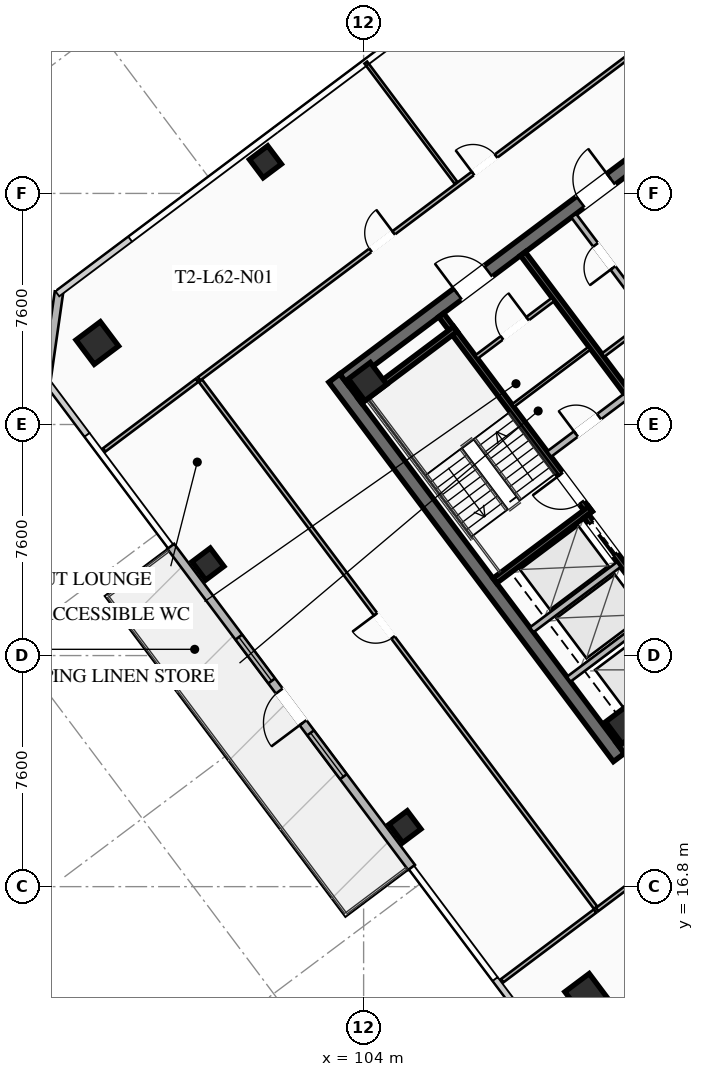
"""IFC4 building model, lengths in metres.
Left out: names, types, materials, properties, quantities, classifications, styles, units other than length and angle.
Written with IfcOpenShell. Run it as: python <this file> out.ifc"""

import sys

from ifc_helpers import new_model, si_unit, direction, frame, frame_2d, origin, origin_2d, place, context, subcontext, project, spatial, rectangle, hollow_rectangle, extrude, element, fill, save


model = new_model("IFC4")
c1 = context("Model", 3, precision=1e-05, world=origin(), true_north=direction((0.0, 1.0)))
c2 = subcontext(c1, "Body", "Model", "MODEL_VIEW")
j1 = project(units=[si_unit("LENGTHUNIT", "METRE"), si_unit("PLANEANGLEUNIT", "RADIAN")], contexts=[c1])
p1 = place(None, origin())
s1 = spatial("IfcSite", under=j1, at=p1, CompositionType="ELEMENT")
p2 = place(p1, origin())
s2 = spatial("IfcBuilding", under=s1, at=p2, CompositionType="ELEMENT")
p3 = place(p2, frame((0.0, 0.0, 229.05)))
s3 = spatial("IfcBuildingStorey", under=s2, at=p3, CompositionType="ELEMENT", Elevation=229.05)
p4 = place(p3, frame((112.396, 21.047, 0.0), z_axis=(0.0, 0.0, 1.0), x_axis=(-0.600005007985, 0.799996243986, 0.0)))
e1 = element("IfcWall", 1, at=p4, inside=s3, PredefinedType="SHEAR", context=c2, shape_type="SweptSolid", body=[
    extrude(rectangle(XDim=15.6, YDim=0.45, at=frame_2d((7.8, 0.0))), origin(), (0.0, 0.0, 1.0), 3.55),
])
p5 = place(p3, frame((124.649, 30.518, 0.0), z_axis=(0.0, 0.0, 1.0), x_axis=(-0.8, -0.6, 0.0)))
e2 = element("IfcWall", 2, at=p5, inside=s3, PredefinedType="SHEAR", context=c2, shape_type="SweptSolid", body=[
    extrude(rectangle(XDim=15.26, YDim=0.45, at=frame_2d((7.63, 0.0))), origin(), (0.0, 0.0, 1.0), 3.55),
])
p6 = place(p5, frame((9.33, 0.0, 0.0)))
e3 = element("IfcOpeningElement", 3, at=p6, cuts=e2, PredefinedType="OPENING", context=c2, shape_type="SweptSolid", body=[
    extrude(rectangle(XDim=1.25, YDim=2.25, at=frame_2d((0.625, 1.125))), frame((0.0, 0.235, 0.0), z_axis=(0.0, -1.0, 0.0), x_axis=(1.0, 0.0, 0.0)), (0.0, 0.0, 1.0), 0.47),
])
p7 = place(p5, frame((4.28, 0.0, 0.0)))
e4 = element("IfcOpeningElement", 4, at=p7, cuts=e2, PredefinedType="OPENING", context=c2, shape_type="SweptSolid", body=[
    extrude(rectangle(XDim=1.25, YDim=2.25, at=frame_2d((0.625, 1.125))), frame((0.0, 0.235, 0.0), z_axis=(0.0, -1.0, 0.0), x_axis=(1.0, 0.0, 0.0)), (0.0, 0.0, 1.0), 0.47),
])
p8 = place(p3, frame((103.351, 33.482, 0.0), z_axis=(0.0, 0.0, 1.0), x_axis=(0.8, 0.6, 0.0)))
e5 = element("IfcWall", 5, at=p8, inside=s3, PredefinedType="SHEAR", context=c2, shape_type="SweptSolid", body=[
    extrude(rectangle(XDim=15.26, YDim=0.45, at=frame_2d((7.63, 0.0))), origin(), (0.0, 0.0, 1.0), 3.55),
])
p9 = place(p8, frame((4.68, 0.0, 0.0)))
e6 = element("IfcOpeningElement", 6, at=p9, cuts=e5, PredefinedType="OPENING", context=c2, shape_type="SweptSolid", body=[
    extrude(rectangle(XDim=1.25, YDim=2.25, at=frame_2d((0.625, 1.125))), frame((0.0, 0.235, 0.0), z_axis=(0.0, -1.0, 0.0), x_axis=(1.0, 0.0, 0.0)), (0.0, 0.0, 1.0), 0.47),
])
p10 = place(p8, frame((9.73, 0.0, 0.0)))
e7 = element("IfcOpeningElement", 7, at=p10, cuts=e5, PredefinedType="OPENING", context=c2, shape_type="SweptSolid", body=[
    extrude(rectangle(XDim=1.25, YDim=2.25, at=frame_2d((0.625, 1.125))), frame((0.0, 0.235, 0.0), z_axis=(0.0, -1.0, 0.0), x_axis=(1.0, 0.0, 0.0)), (0.0, 0.0, 1.0), 0.47),
])
for number, where, z_axis, x_axis in (
    (8, (112.59, 22.13, 0.0), (0.0, 0.0, 1.0), (0.8, 0.6, 0.0)),
    (9, (104.13, 33.41, 0.0), (0.0, 0.0, 1.0), (0.8, 0.6, 0.0)),
):
    element("IfcColumn", number, at=place(p3, frame(where, z_axis=z_axis, x_axis=x_axis)), inside=s3, PredefinedType="COLUMN", context=c2, shape_type="SweptSolid", body=[
        extrude(hollow_rectangle(XDim=0.9, YDim=0.9, WallThickness=0.04, at=origin_2d()), origin(), (0.0, 0.0, 1.0), 3.37),
    ])
for number, where, z_axis, x_axis in (
    (10, (111.32, 13.24, 0.0), (0.0, 0.0, 1.0), (0.8, 0.6, 0.0)),
    (11, (95.24, 34.68, 0.0), (0.0, 0.0, 1.0), (0.8, 0.6, 0.0)),
):
    element("IfcColumn", number, at=place(p3, frame(where, z_axis=z_axis, x_axis=x_axis)), inside=s3, PredefinedType="COLUMN", context=c2, shape_type="SweptSolid", body=[
        extrude(hollow_rectangle(XDim=1.0, YDim=1.0, WallThickness=0.04, at=origin_2d()), origin(), (0.0, 0.0, 1.0), 3.37),
    ])
for number, where, z_axis, x_axis in (
    (12, (100.77, 40.64, 0.0), (0.0, 0.0, 1.0), (0.8, 0.6, 0.0)),
    (13, (98.88, 27.41, 0.0), (0.0, 0.0, 1.0), (0.8, 0.6, 0.0)),
    (14, (105.36, 18.77, 0.0), (0.0, 0.0, 1.0), (0.8, 0.6, 0.0)),
):
    element("IfcColumn", number, at=place(p3, frame(where, z_axis=z_axis, x_axis=x_axis)), inside=s3, PredefinedType="COLUMN", context=c2, shape_type="SweptSolid", body=[
        extrude(hollow_rectangle(XDim=0.75, YDim=0.75, WallThickness=0.032, at=origin_2d()), origin(), (0.0, 0.0, 1.0), 3.37),
    ])
p11 = place(p3, frame((105.576, 17.432, 0.0), z_axis=(0.0, 0.0, 1.0), x_axis=(-0.599994081423, 0.800004438899, 0.0)))
e15 = element("IfcWall", 15, at=p11, inside=s3, PredefinedType="SOLIDWALL", context=c2, shape_type="SweptSolid", body=[
    extrude(rectangle(XDim=13.2, YDim=0.28, at=frame_2d((6.6, 0.0))), origin(), (0.0, 0.0, 1.0), 3.37),
])
p12 = place(p11, frame((5.95, 0.0, 0.0)))
e16 = element("IfcOpeningElement", 16, at=p12, cuts=e15, PredefinedType="OPENING", context=c2, shape_type="SweptSolid", body=[
    extrude(rectangle(XDim=1.3, YDim=2.15, at=frame_2d((0.65, 1.075))), frame((0.0, 0.15, 0.0), z_axis=(0.0, -1.0, 0.0), x_axis=(1.0, 0.0, 0.0)), (0.0, 0.0, 1.0), 0.3),
])
p13 = place(p11, frame((3.732, 0.0, 0.85)))
e17 = element("IfcOpeningElement", 17, at=p13, cuts=e15, PredefinedType="OPENING", context=c2, shape_type="SweptSolid", body=[
    extrude(rectangle(XDim=1.8, YDim=1.92, at=frame_2d((0.9, 0.96))), frame((0.0, 0.15, 0.0), z_axis=(0.0, -1.0, 0.0), x_axis=(1.0, 0.0, 0.0)), (0.0, 0.0, 1.0), 0.3),
])
p14 = place(p11, frame((7.668, 0.0, 0.85)))
e18 = element("IfcOpeningElement", 18, at=p14, cuts=e15, PredefinedType="OPENING", context=c2, shape_type="SweptSolid", body=[
    extrude(rectangle(XDim=1.8, YDim=1.92, at=frame_2d((0.9, 0.96))), frame((0.0, 0.15, 0.0), z_axis=(0.0, -1.0, 0.0), x_axis=(1.0, 0.0, 0.0)), (0.0, 0.0, 1.0), 0.3),
])
p15 = place(p3, frame((93.56, 33.42, 0.0), z_axis=(0.0, 0.0, 1.0), x_axis=(0.14138683146, 0.989954425158, 0.0)))
e19 = element("IfcWall", 19, at=p15, inside=s3, PredefinedType="SOLIDWALL", context=c2, shape_type="SweptSolid", body=[
    extrude(rectangle(XDim=2.97, YDim=0.28, at=frame_2d((1.485, 0.0))), origin(), (0.0, 0.0, 1.0), 3.37),
])
p16 = place(p3, frame((111.44, 29.08, 0.0), z_axis=(0.0, 0.0, 1.0), x_axis=(-0.59999041401, 0.800007189403, 0.0)))
e20 = element("IfcWall", 20, at=p16, inside=s3, PredefinedType="SHEAR", context=c2, shape_type="SweptSolid", body=[
    extrude(rectangle(XDim=8.15, YDim=0.2, at=frame_2d((4.075, 0.0))), origin(), (0.0, 0.0, 1.0), 3.37),
])
p17 = place(p16, frame((0.45, 0.0, 0.0)))
e21 = element("IfcOpeningElement", 21, at=p17, cuts=e20, PredefinedType="OPENING", context=c2, shape_type="SweptSolid", body=[
    extrude(rectangle(XDim=1.15, YDim=2.2, at=frame_2d((0.575, 1.1))), frame((0.0, 0.11, 0.0), z_axis=(0.0, -1.0, 0.0), x_axis=(1.0, 0.0, 0.0)), (0.0, 0.0, 1.0), 0.22),
])
for number, where, z_axis, x_axis in (
    (22, (108.316, 26.862, 0.0), (0.0, 0.0, 1.0), (0.8, 0.6, 0.0)),
    (23, (103.876, 32.782, 0.0), (0.0, 0.0, 1.0), (0.8, 0.6, 0.0)),
):
    element("IfcWall", number, at=place(p3, frame(where, z_axis=z_axis, x_axis=x_axis)), inside=s3, PredefinedType="SHEAR", context=c2, shape_type="SweptSolid", body=[
        extrude(rectangle(XDim=3.93, YDim=0.2, at=frame_2d((1.965, 0.0))), origin(), (0.0, 0.0, 1.0), 3.37),
    ])
p18 = place(p3, frame((118.058, 25.856, 0.0), z_axis=(0.0, 0.0, 1.0), x_axis=(-0.600002657301, 0.799998007018, 0.0)))
e24 = element("IfcWall", 24, at=p18, inside=s3, PredefinedType="SHEAR", context=c2, shape_type="SweptSolid", body=[
    extrude(rectangle(XDim=14.7, YDim=0.2, at=frame_2d((7.35, 0.0))), origin(), (0.0, 0.0, 1.0), 3.37),
])
p19 = place(p3, frame((110.104, 31.028, 0.0), z_axis=(0.0, 0.0, 1.0), x_axis=(0.800018601094, 0.59997519774, 0.0)))
e25 = element("IfcWall", 25, at=p19, inside=s3, PredefinedType="SOLIDWALL", context=c2, shape_type="SweptSolid", body=[
    extrude(rectangle(XDim=3.15, YDim=0.22, at=frame_2d((1.575, 0.0))), origin(), (0.0, 0.0, 1.0), 2.513),
])
p20 = place(p19, frame((1.1, 0.0, 0.0)))
e26 = element("IfcOpeningElement", 26, at=p20, cuts=e25, PredefinedType="OPENING", context=c2, shape_type="SweptSolid", body=[
    extrude(rectangle(XDim=0.95, YDim=2.05, at=frame_2d((0.475, 1.025))), frame((0.0, 0.12, 0.0), z_axis=(0.0, -1.0, 0.0), x_axis=(1.0, 0.0, 0.0)), (0.0, 0.0, 1.0), 0.24),
])
p21 = place(p3, frame((115.25, 23.75, 0.0), z_axis=(0.0, 0.0, 1.0), x_axis=(-0.599994036198, 0.800004472816, 0.0)))
e27 = element("IfcWall", 27, at=p21, inside=s3, PredefinedType="SHEAR", context=c2, shape_type="SweptSolid", body=[
    extrude(rectangle(XDim=6.55, YDim=0.2, at=frame_2d((3.275, 0.0))), origin(), (0.0, 0.0, 1.0), 3.37),
])
p22 = place(p21, frame((4.975, 0.0, 0.0)))
e28 = element("IfcOpeningElement", 28, at=p22, cuts=e27, PredefinedType="OPENING", context=c2, shape_type="SweptSolid", body=[
    extrude(rectangle(XDim=1.3, YDim=2.25, at=frame_2d((0.65, 1.125))), frame((0.0, 0.11, 0.0), z_axis=(0.0, -1.0, 0.0), x_axis=(1.0, 0.0, 0.0)), (0.0, 0.0, 1.0), 0.22),
])
p23 = place(p21, frame((2.975, 0.0, 0.0)))
e29 = element("IfcOpeningElement", 29, at=p23, cuts=e27, PredefinedType="OPENING", context=c2, shape_type="SweptSolid", body=[
    extrude(rectangle(XDim=1.3, YDim=2.25, at=frame_2d((0.65, 1.125))), frame((0.0, 0.11, 0.0), z_axis=(0.0, -1.0, 0.0), x_axis=(1.0, 0.0, 0.0)), (0.0, 0.0, 1.0), 0.22),
])
p24 = place(p21, frame((0.775, 0.0, 0.0)))
e30 = element("IfcOpeningElement", 30, at=p24, cuts=e27, PredefinedType="OPENING", context=c2, shape_type="SweptSolid", body=[
    extrude(rectangle(XDim=1.3, YDim=2.25, at=frame_2d((0.65, 1.125))), frame((0.0, 0.11, 0.0), z_axis=(0.0, -1.0, 0.0), x_axis=(1.0, 0.0, 0.0)), (0.0, 0.0, 1.0), 0.22),
])
for number, where, z_axis, x_axis in (
    (31, (110.746, 23.622, 0.0), (0.0, 0.0, 1.0), (0.8, 0.6, 0.0)),
    (32, (109.528, 25.246, 0.0), (0.0, 0.0, 1.0), (0.8, 0.6, 0.0)),
):
    element("IfcWall", number, at=place(p3, frame(where, z_axis=z_axis, x_axis=x_axis)), inside=s3, PredefinedType="SOLIDWALL", context=c2, shape_type="SweptSolid", body=[
        extrude(rectangle(XDim=3.58, YDim=0.2, at=frame_2d((1.79, 0.0))), origin(), (0.0, 0.0, 1.0), 3.37),
    ])
p25 = place(p3, frame((107.71, 34.22, 0.0), z_axis=(0.0, 0.0, 1.0), x_axis=(0.799981399002, 0.60002480053, 0.0)))
e33 = element("IfcWall", 33, at=p25, inside=s3, PredefinedType="PARTITIONING", context=c2, shape_type="SweptSolid", body=[
    extrude(rectangle(XDim=3.15, YDim=0.135, at=frame_2d((1.575, 0.0))), origin(), (0.0, 0.0, 1.0), 2.513),
])
p26 = place(p25, frame((1.05, 0.0, 0.0)))
e34 = element("IfcOpeningElement", 34, at=p26, cuts=e33, PredefinedType="OPENING", context=c2, shape_type="SweptSolid", body=[
    extrude(rectangle(XDim=1.05, YDim=2.2, at=frame_2d((0.525, 1.1))), frame((0.0, 0.077, 0.0), z_axis=(0.0, -1.0, 0.0), x_axis=(1.0, 0.0, 0.0)), (0.0, 0.0, 1.0), 0.155),
])
p27 = place(p3, frame((108.91, 32.62, 0.0), z_axis=(0.0, 0.0, 1.0), x_axis=(0.800018601094, 0.59997519774, 0.0)))
e35 = element("IfcWall", 35, at=p27, inside=s3, PredefinedType="PARTITIONING", context=c2, shape_type="SweptSolid", body=[
    extrude(rectangle(XDim=3.15, YDim=0.11, at=frame_2d((1.575, 0.0))), origin(), (0.0, 0.0, 1.0), 2.513),
])
p28 = place(p3, frame((115.11, 33.27, 0.0), z_axis=(0.0, 0.0, 1.0), x_axis=(-0.600011160345, 0.79999162962, 0.0)))
e36 = element("IfcWall", 36, at=p28, inside=s3, PredefinedType="SOLIDWALL", context=c2, shape_type="SweptSolid", body=[
    extrude(rectangle(XDim=7.0, YDim=0.2, at=frame_2d((3.5, 0.0))), origin(), (0.0, 0.0, 1.0), 2.513),
])
p29 = place(p28, frame((0.85, 0.0, 0.0)))
e37 = element("IfcOpeningElement", 37, at=p29, cuts=e36, PredefinedType="OPENING", context=c2, shape_type="SweptSolid", body=[
    extrude(rectangle(XDim=0.95, YDim=2.05, at=frame_2d((0.475, 1.025))), frame((0.0, 0.11, 0.0), z_axis=(0.0, -1.0, 0.0), x_axis=(1.0, 0.0, 0.0)), (0.0, 0.0, 1.0), 0.22),
])
p30 = place(p28, frame((4.85, 0.0, 0.0)))
e38 = element("IfcOpeningElement", 38, at=p30, cuts=e36, PredefinedType="OPENING", context=c2, shape_type="SweptSolid", body=[
    extrude(rectangle(XDim=0.95, YDim=2.05, at=frame_2d((0.475, 1.025))), frame((0.0, 0.11, 0.0), z_axis=(0.0, -1.0, 0.0), x_axis=(1.0, 0.0, 0.0)), (0.0, 0.0, 1.0), 0.22),
])
p31 = place(p3, frame((111.876, 34.282, 0.0), z_axis=(0.0, 0.0, 1.0), x_axis=(0.8, 0.6, 0.0)))
e39 = element("IfcWall", 39, at=p31, inside=s3, PredefinedType="PARTITIONING", context=c2, shape_type="SweptSolid", body=[
    extrude(rectangle(XDim=1.88, YDim=0.135, at=frame_2d((0.94, 0.0))), origin(), (0.0, 0.0, 1.0), 2.513),
])
p32 = place(p3, frame((98.586, 33.502, 0.0), z_axis=(0.0, 0.0, 1.0), x_axis=(0.8, 0.6, 0.0)))
e40 = element("IfcWall", 40, at=p32, inside=s3, PredefinedType="PARTITIONING", context=c2, shape_type="SweptSolid", body=[
    extrude(rectangle(XDim=24.68, YDim=0.135, at=frame_2d((12.34, 0.0))), origin(), (0.0, 0.0, 1.0), 2.513),
])
p33 = place(p32, frame((7.05, 0.0, 0.0)))
e41 = element("IfcOpeningElement", 41, at=p33, cuts=e40, PredefinedType="OPENING", context=c2, shape_type="SweptSolid", body=[
    extrude(rectangle(XDim=0.95, YDim=2.05, at=frame_2d((0.475, 1.025))), frame((0.0, 0.077, 0.0), z_axis=(0.0, -1.0, 0.0), x_axis=(1.0, 0.0, 0.0)), (0.0, 0.0, 1.0), 0.155),
])
p34 = place(p32, frame((11.263, 0.0, 0.0)))
e42 = element("IfcOpeningElement", 42, at=p34, cuts=e40, PredefinedType="OPENING", context=c2, shape_type="SweptSolid", body=[
    extrude(rectangle(XDim=0.95, YDim=2.05, at=frame_2d((0.475, 1.025))), frame((0.0, 0.077, 0.0), z_axis=(0.0, -1.0, 0.0), x_axis=(1.0, 0.0, 0.0)), (0.0, 0.0, 1.0), 0.155),
])
p35 = place(p3, frame((107.042, 39.944, 0.0), z_axis=(0.0, 0.0, 1.0), x_axis=(-0.6, 0.8, 0.0)))
e43 = element("IfcWall", 43, at=p35, inside=s3, PredefinedType="PARTITIONING", context=c2, shape_type="SweptSolid", body=[
    extrude(rectangle(XDim=4.95, YDim=0.11, at=frame_2d((2.475, 0.0))), origin(), (0.0, 0.0, 1.0), 2.513),
])
p36 = place(p3, frame((124.342, 25.544, 0.0), z_axis=(0.0, 0.0, 1.0), x_axis=(-0.8, -0.6, 0.0)))
e44 = element("IfcWall", 44, at=p36, inside=s3, PredefinedType="PARTITIONING", context=c2, shape_type="SweptSolid", body=[
    extrude(rectangle(XDim=15.83, YDim=0.135, at=frame_2d((7.915, 0.0))), origin(), (0.0, 0.0, 1.0), 2.513),
])
p37 = place(p36, frame((3.658, 0.0, 0.0)))
e45 = element("IfcOpeningElement", 45, at=p37, cuts=e44, PredefinedType="OPENING", context=c2, shape_type="SweptSolid", body=[
    extrude(rectangle(XDim=0.95, YDim=2.05, at=frame_2d((0.475, 1.025))), frame((0.0, 0.077, 0.0), z_axis=(0.0, -1.0, 0.0), x_axis=(1.0, 0.0, 0.0)), (0.0, 0.0, 1.0), 0.155),
])
p38 = place(p3, frame((111.63, 16.11, 0.0), z_axis=(0.0, 0.0, 1.0), x_axis=(-0.599998196544, 0.800001352589, 0.0)))
e46 = element("IfcWall", 46, at=p38, inside=s3, PredefinedType="PARTITIONING", context=c2, shape_type="SweptSolid", body=[
    extrude(rectangle(XDim=21.66, YDim=0.135, at=frame_2d((10.83, 0.0))), origin(), (0.0, 0.0, 1.0), 2.513),
])
p39 = place(p38, frame((11.109, 0.0, 0.0)))
e47 = element("IfcOpeningElement", 47, at=p39, cuts=e46, PredefinedType="OPENING", context=c2, shape_type="SweptSolid", body=[
    extrude(rectangle(XDim=0.95, YDim=2.05, at=frame_2d((0.475, 1.025))), frame((0.0, 0.077, 0.0), z_axis=(0.0, -1.0, 0.0), x_axis=(1.0, 0.0, 0.0)), (0.0, 0.0, 1.0), 0.155),
])
for number, where, z_axis, x_axis in (
    (48, (98.522, 33.454, 0.0), (0.0, 0.0, 1.0), (-0.8, -0.6, 0.0)),
    (49, (108.558, 13.706, 0.0), (0.0, 0.0, 1.0), (0.8, 0.6, 0.0)),
):
    element("IfcWall", number, at=place(p3, frame(where, z_axis=z_axis, x_axis=x_axis)), inside=s3, PredefinedType="PARTITIONING", context=c2, shape_type="SweptSolid", body=[
        extrude(rectangle(XDim=3.82, YDim=0.135, at=frame_2d((1.91, 0.0))), origin(), (0.0, 0.0, 1.0), 2.513),
    ])
p40 = place(p12, origin())
e50 = element("IfcDoor", 50, at=p40, inside=s3, OperationType="SINGLE_SWING_LEFT", PredefinedType="DOOR", context=c2, shape_type="SweptSolid", body=[
    extrude(rectangle(XDim=1.3, YDim=2.15, at=frame_2d((0.65, 1.075))), frame((0.0, 0.025, 0.0), z_axis=(0.0, -1.0, 0.0), x_axis=(1.0, 0.0, 0.0)), (0.0, 0.0, 1.0), 0.05),
])
fill(e16, e50)
p41 = place(p13, origin())
e51 = element("IfcWindow", 51, at=p41, inside=s3, PartitioningType="SINGLE_PANEL", PredefinedType="WINDOW", context=c2, shape_type="SweptSolid", body=[
    extrude(rectangle(XDim=1.8, YDim=1.92, at=frame_2d((0.9, 0.96))), frame((0.0, 0.03, 0.0), z_axis=(0.0, -1.0, 0.0), x_axis=(1.0, 0.0, 0.0)), (0.0, 0.0, 1.0), 0.06),
])
fill(e17, e51)
p42 = place(p14, origin())
e52 = element("IfcWindow", 52, at=p42, inside=s3, PartitioningType="SINGLE_PANEL", PredefinedType="WINDOW", context=c2, shape_type="SweptSolid", body=[
    extrude(rectangle(XDim=1.8, YDim=1.92, at=frame_2d((0.9, 0.96))), frame((0.0, 0.03, 0.0), z_axis=(0.0, -1.0, 0.0), x_axis=(1.0, 0.0, 0.0)), (0.0, 0.0, 1.0), 0.06),
])
fill(e18, e52)
p43 = place(p9, origin())
e53 = element("IfcDoor", 53, at=p43, inside=s3, OperationType="SINGLE_SWING_LEFT", PredefinedType="DOOR", context=c2, shape_type="SweptSolid", body=[
    extrude(rectangle(XDim=1.25, YDim=2.25, at=frame_2d((0.625, 1.125))), frame((0.0, 0.025, 0.0), z_axis=(0.0, -1.0, 0.0), x_axis=(1.0, 0.0, 0.0)), (0.0, 0.0, 1.0), 0.05),
])
fill(e6, e53)
p44 = place(p10, origin())
e54 = element("IfcDoor", 54, at=p44, inside=s3, OperationType="SINGLE_SWING_RIGHT", PredefinedType="DOOR", context=c2, shape_type="SweptSolid", body=[
    extrude(rectangle(XDim=1.25, YDim=2.25, at=frame_2d((0.625, 1.125))), frame((0.0, 0.025, 0.0), z_axis=(0.0, -1.0, 0.0), x_axis=(1.0, 0.0, 0.0)), (0.0, 0.0, 1.0), 0.05),
])
fill(e7, e54)
p45 = place(p17, origin())
e55 = element("IfcDoor", 55, at=p45, inside=s3, OperationType="SINGLE_SWING_RIGHT", PredefinedType="DOOR", context=c2, shape_type="SweptSolid", body=[
    extrude(rectangle(XDim=1.15, YDim=2.2, at=frame_2d((0.575, 1.1))), frame((0.0, 0.025, 0.0), z_axis=(0.0, -1.0, 0.0), x_axis=(1.0, 0.0, 0.0)), (0.0, 0.0, 1.0), 0.05),
])
fill(e21, e55)
p46 = place(p26, origin())
e56 = element("IfcDoor", 56, at=p46, inside=s3, OperationType="SINGLE_SWING_RIGHT", PredefinedType="DOOR", context=c2, shape_type="SweptSolid", body=[
    extrude(rectangle(XDim=1.05, YDim=2.2, at=frame_2d((0.525, 1.1))), frame((0.0, 0.025, 0.0), z_axis=(0.0, -1.0, 0.0), x_axis=(1.0, 0.0, 0.0)), (0.0, 0.0, 1.0), 0.05),
])
fill(e34, e56)
p47 = place(p20, origin())
e57 = element("IfcDoor", 57, at=p47, inside=s3, OperationType="SINGLE_SWING_LEFT", PredefinedType="DOOR", context=c2, shape_type="SweptSolid", body=[
    extrude(rectangle(XDim=0.95, YDim=2.05, at=frame_2d((0.475, 1.025))), frame((0.0, 0.025, 0.0), z_axis=(0.0, -1.0, 0.0), x_axis=(1.0, 0.0, 0.0)), (0.0, 0.0, 1.0), 0.05),
])
fill(e26, e57)
p48 = place(p30, origin())
e58 = element("IfcDoor", 58, at=p48, inside=s3, OperationType="SINGLE_SWING_LEFT", PredefinedType="DOOR", context=c2, shape_type="SweptSolid", body=[
    extrude(rectangle(XDim=0.95, YDim=2.05, at=frame_2d((0.475, 1.025))), frame((0.0, 0.025, 0.0), z_axis=(0.0, -1.0, 0.0), x_axis=(1.0, 0.0, 0.0)), (0.0, 0.0, 1.0), 0.05),
])
fill(e38, e58)
p49 = place(p33, origin())
e59 = element("IfcDoor", 59, at=p49, inside=s3, OperationType="SINGLE_SWING_RIGHT", PredefinedType="DOOR", context=c2, shape_type="SweptSolid", body=[
    extrude(rectangle(XDim=0.95, YDim=2.05, at=frame_2d((0.475, 1.025))), frame((0.0, 0.025, 0.0), z_axis=(0.0, -1.0, 0.0), x_axis=(1.0, 0.0, 0.0)), (0.0, 0.0, 1.0), 0.05),
])
fill(e41, e59)
p50 = place(p34, origin())
e60 = element("IfcDoor", 60, at=p50, inside=s3, OperationType="SINGLE_SWING_LEFT", PredefinedType="DOOR", context=c2, shape_type="SweptSolid", body=[
    extrude(rectangle(XDim=0.95, YDim=2.05, at=frame_2d((0.475, 1.025))), frame((0.0, 0.025, 0.0), z_axis=(0.0, -1.0, 0.0), x_axis=(1.0, 0.0, 0.0)), (0.0, 0.0, 1.0), 0.05),
])
fill(e42, e60)
p51 = place(p39, origin())
e61 = element("IfcDoor", 61, at=p51, inside=s3, OperationType="SINGLE_SWING_RIGHT", PredefinedType="DOOR", context=c2, shape_type="SweptSolid", body=[
    extrude(rectangle(XDim=0.95, YDim=2.05, at=frame_2d((0.475, 1.025))), frame((0.0, 0.025, 0.0), z_axis=(0.0, -1.0, 0.0), x_axis=(1.0, 0.0, 0.0)), (0.0, 0.0, 1.0), 0.05),
])
fill(e47, e61)
p52 = place(p22, origin())
e62 = element("IfcDoor", 62, at=p52, inside=s3, OperationType="SLIDING_TO_LEFT", PredefinedType="DOOR", context=c2, shape_type="SweptSolid", body=[
    extrude(rectangle(XDim=1.3, YDim=2.25, at=frame_2d((0.65, 1.125))), frame((0.0, 0.025, 0.0), z_axis=(0.0, -1.0, 0.0), x_axis=(1.0, 0.0, 0.0)), (0.0, 0.0, 1.0), 0.05),
])
fill(e28, e62)
save(model, sys.argv[1])
